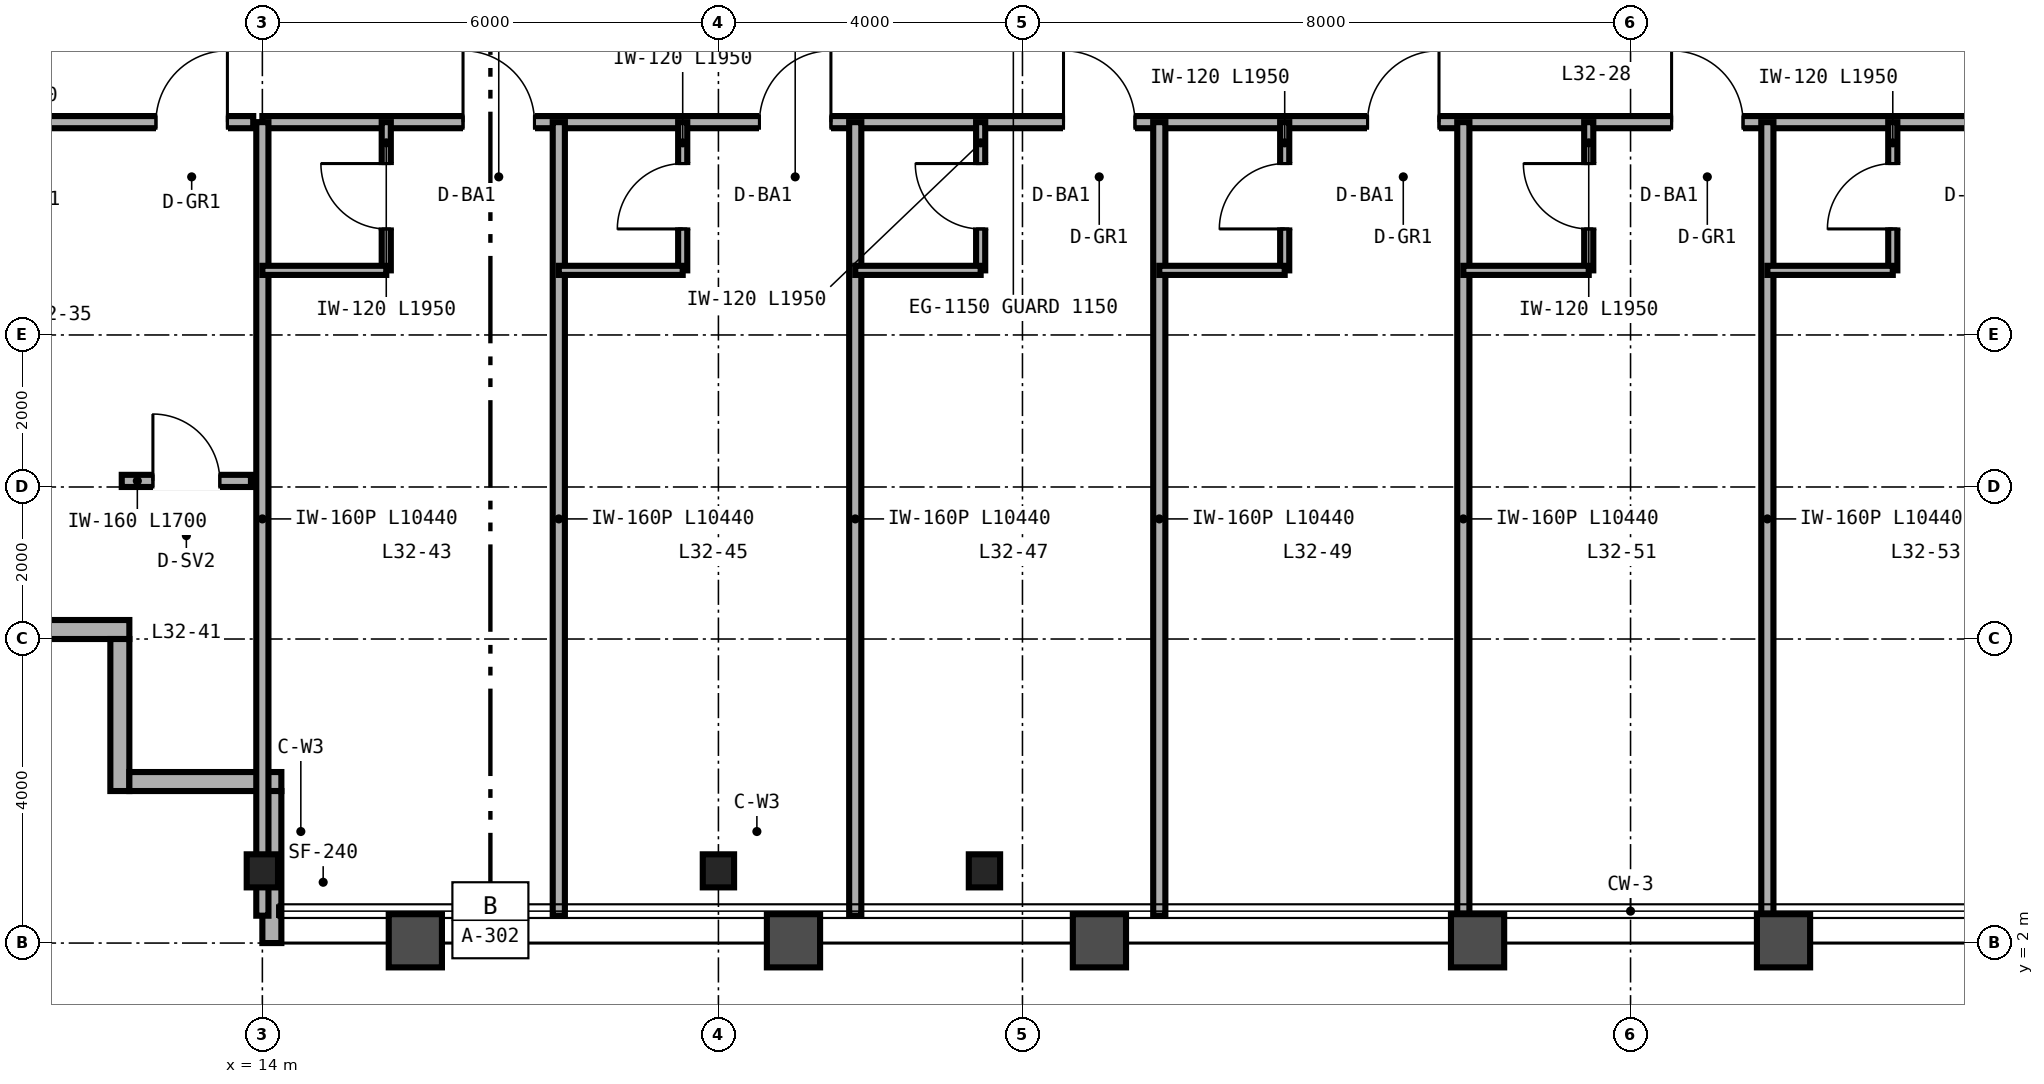
"""IFC4 building model, lengths in metres.
Left out: names, types, materials, properties, quantities, classifications, styles, units other than length and angle.
Written with IfcOpenShell. Run it as: python <this file> out.ifc"""

import sys

from ifc_helpers import new_model, si_unit, direction, frame, frame_2d, origin, origin_2d, place, context, subcontext, project, spatial, rectangle, i_section, extrude, source, transform, mapped, element, fill, save


model = new_model("IFC4")
c1 = context("Model", 3, precision=1e-05, world=origin(), true_north=direction((0.0, 1.0)))
c2 = subcontext(c1, "Body", "Model", "MODEL_VIEW")
j1 = project(units=[si_unit("LENGTHUNIT", "METRE"), si_unit("PLANEANGLEUNIT", "RADIAN")], contexts=[c1])
p1 = place(None, origin())
s1 = spatial("IfcSite", under=j1, at=p1, CompositionType="ELEMENT")
p2 = place(p1, origin())
s2 = spatial("IfcBuilding", under=s1, at=p2, CompositionType="ELEMENT")
p3 = place(p2, frame((0.0, 0.0, 129.6)))
s3 = spatial("IfcBuildingStorey", under=s2, at=p3, CompositionType="ELEMENT", Elevation=129.6)
m1 = source(origin(), c2, "Body", "SweptSolid", [
    extrude(i_section(OverallWidth=0.412, OverallDepth=0.435, WebThickness=0.036, FlangeThickness=0.057, FilletRadius=0.025, at=origin_2d()), origin(), (0.0, 0.0, 1.0), 3.36),
])
for number, where, z_axis, x_axis in (
    (1, (14.0, 2.95, 0.0), (0.0, 0.0, 1.0), (1.0, 0.0, 0.0)),
    (2, (20.0, 2.95, 0.0), (0.0, 0.0, 1.0), (1.0, 0.0, 0.0)),
    (3, (23.5, 2.95, 0.0), (0.0, 0.0, 1.0), (1.0, 0.0, 0.0)),
):
    element("IfcColumn", number, at=place(p3, frame(where, z_axis=z_axis, x_axis=x_axis)), inside=s3, PredefinedType="COLUMN", context=c2, shape_type="MappedRepresentation", body=[
        mapped(m1, transform((0.0, 0.0, 0.0), scale=1.0)),
    ])
for number, where, z_axis, x_axis in (
    (4, (10.25, 6.125, 0.0), (0.0, 0.0, 1.0), (1.0, 0.0, 0.0)),
    (5, (12.125, 6.0, 0.0), (0.0, 0.0, 1.0), (0.0, -1.0, 0.0)),
    (6, (12.25, 4.125, 0.0), (0.0, 0.0, 1.0), (1.0, 0.0, 0.0)),
):
    element("IfcWall", number, at=place(p3, frame(where, z_axis=z_axis, x_axis=x_axis)), inside=s3, PredefinedType="SOLIDWALL", context=c2, shape_type="SweptSolid", body=[
        extrude(rectangle(XDim=2.0, YDim=0.25, at=frame_2d((1.0, 0.0))), origin(), (0.0, 0.0, 1.0), 3.36),
    ])
p4 = place(p3, frame((14.125, 4.0, 0.0), z_axis=(0.0, 0.0, 1.0), x_axis=(0.0, -1.0, 0.0)))
e7 = element("IfcWall", 7, at=p4, inside=s3, PredefinedType="SOLIDWALL", context=c2, shape_type="SweptSolid", body=[
    extrude(rectangle(XDim=2.0, YDim=0.25, at=frame_2d((1.0, 0.0))), origin(), (0.0, 0.0, 1.0), 2.667),
])
p5 = place(p3, frame((8.2, 12.8, 0.0), z_axis=(0.0, 0.0, 1.0), x_axis=(1.0, 0.0, 0.0)))
e8 = element("IfcWall", 8, at=p5, inside=s3, PredefinedType="PARTITIONING", context=c2, shape_type="SweptSolid", body=[
    extrude(rectangle(XDim=5.68, YDim=0.16, at=frame_2d((2.84, 0.0))), origin(), (0.0, 0.0, 1.0), 3.36),
])
p6 = place(p5, frame((4.4, 0.0, 0.0)))
e9 = element("IfcOpeningElement", 9, at=p6, cuts=e8, PredefinedType="OPENING", context=c2, shape_type="SweptSolid", body=[
    extrude(rectangle(XDim=0.94, YDim=2.15, at=frame_2d((0.47, 1.075))), frame((0.0, 0.09, 0.0), z_axis=(0.0, -1.0, 0.0), x_axis=(1.0, 0.0, 0.0)), (0.0, 0.0, 1.0), 0.18),
])
p7 = place(p3, frame((12.15, 8.08, 0.0), z_axis=(0.0, 0.0, 1.0), x_axis=(1.0, 0.0, 0.0)))
e10 = element("IfcWall", 10, at=p7, inside=s3, PredefinedType="PARTITIONING", context=c2, shape_type="SweptSolid", body=[
    extrude(rectangle(XDim=1.7, YDim=0.16, at=frame_2d((0.85, 0.0))), origin(), (0.0, 0.0, 1.0), 3.36),
])
p8 = place(p7, frame((0.41, 0.0, 0.0)))
e11 = element("IfcOpeningElement", 11, at=p8, cuts=e10, PredefinedType="OPENING", context=c2, shape_type="SweptSolid", body=[
    extrude(rectangle(XDim=0.88, YDim=2.15, at=frame_2d((0.44, 1.075))), frame((0.0, 0.09, 0.0), z_axis=(0.0, -1.0, 0.0), x_axis=(1.0, 0.0, 0.0)), (0.0, 0.0, 1.0), 0.18),
])
p9 = place(p3, frame((14.0, 12.8, 0.0), z_axis=(0.0, 0.0, 1.0), x_axis=(1.0, 0.0, 0.0)))
e12 = element("IfcWall", 12, at=p9, inside=s3, PredefinedType="PARTITIONING", context=c2, shape_type="SweptSolid", body=[
    extrude(rectangle(XDim=36.0, YDim=0.16, at=frame_2d((18.0, 0.0))), origin(), (0.0, 0.0, 1.0), 2.581),
])
p10 = place(p9, frame((2.64, 0.0, 0.0)))
e13 = element("IfcOpeningElement", 13, at=p10, cuts=e12, PredefinedType="OPENING", context=c2, shape_type="SweptSolid", body=[
    extrude(rectangle(XDim=0.94, YDim=2.15, at=frame_2d((0.47, 1.075))), frame((0.0, 0.09, 0.0), z_axis=(0.0, -1.0, 0.0), x_axis=(1.0, 0.0, 0.0)), (0.0, 0.0, 1.0), 0.18),
])
p11 = place(p9, frame((6.54, 0.0, 0.0)))
e14 = element("IfcOpeningElement", 14, at=p11, cuts=e12, PredefinedType="OPENING", context=c2, shape_type="SweptSolid", body=[
    extrude(rectangle(XDim=0.94, YDim=2.15, at=frame_2d((0.47, 1.075))), frame((0.0, 0.09, 0.0), z_axis=(0.0, -1.0, 0.0), x_axis=(1.0, 0.0, 0.0)), (0.0, 0.0, 1.0), 0.18),
])
p12 = place(p9, frame((10.54, 0.0, 0.0)))
e15 = element("IfcOpeningElement", 15, at=p12, cuts=e12, PredefinedType="OPENING", context=c2, shape_type="SweptSolid", body=[
    extrude(rectangle(XDim=0.94, YDim=2.15, at=frame_2d((0.47, 1.075))), frame((0.0, 0.09, 0.0), z_axis=(0.0, -1.0, 0.0), x_axis=(1.0, 0.0, 0.0)), (0.0, 0.0, 1.0), 0.18),
])
p13 = place(p9, frame((14.54, 0.0, 0.0)))
e16 = element("IfcOpeningElement", 16, at=p13, cuts=e12, PredefinedType="OPENING", context=c2, shape_type="SweptSolid", body=[
    extrude(rectangle(XDim=0.94, YDim=2.15, at=frame_2d((0.47, 1.075))), frame((0.0, 0.09, 0.0), z_axis=(0.0, -1.0, 0.0), x_axis=(1.0, 0.0, 0.0)), (0.0, 0.0, 1.0), 0.18),
])
p14 = place(p9, frame((18.54, 0.0, 0.0)))
e17 = element("IfcOpeningElement", 17, at=p14, cuts=e12, PredefinedType="OPENING", context=c2, shape_type="SweptSolid", body=[
    extrude(rectangle(XDim=0.94, YDim=2.15, at=frame_2d((0.47, 1.075))), frame((0.0, 0.09, 0.0), z_axis=(0.0, -1.0, 0.0), x_axis=(1.0, 0.0, 0.0)), (0.0, 0.0, 1.0), 0.18),
])
p15 = place(p9, frame((22.54, 0.0, 0.0)))
e18 = element("IfcOpeningElement", 18, at=p15, cuts=e12, PredefinedType="OPENING", context=c2, shape_type="SweptSolid", body=[
    extrude(rectangle(XDim=0.94, YDim=2.15, at=frame_2d((0.47, 1.075))), frame((0.0, 0.09, 0.0), z_axis=(0.0, -1.0, 0.0), x_axis=(1.0, 0.0, 0.0)), (0.0, 0.0, 1.0), 0.18),
])
p16 = place(p9, frame((26.54, 0.0, 0.0)))
e19 = element("IfcOpeningElement", 19, at=p16, cuts=e12, PredefinedType="OPENING", context=c2, shape_type="SweptSolid", body=[
    extrude(rectangle(XDim=0.94, YDim=2.15, at=frame_2d((0.47, 1.075))), frame((0.0, 0.09, 0.0), z_axis=(0.0, -1.0, 0.0), x_axis=(1.0, 0.0, 0.0)), (0.0, 0.0, 1.0), 0.18),
])
p17 = place(p9, frame((30.64, 0.0, 0.0)))
e20 = element("IfcOpeningElement", 20, at=p17, cuts=e12, PredefinedType="OPENING", context=c2, shape_type="SweptSolid", body=[
    extrude(rectangle(XDim=0.94, YDim=2.15, at=frame_2d((0.47, 1.075))), frame((0.0, 0.09, 0.0), z_axis=(0.0, -1.0, 0.0), x_axis=(1.0, 0.0, 0.0)), (0.0, 0.0, 1.0), 0.18),
])
p18 = place(p9, frame((34.74, 0.0, 0.0)))
e21 = element("IfcOpeningElement", 21, at=p18, cuts=e12, PredefinedType="OPENING", context=c2, shape_type="SweptSolid", body=[
    extrude(rectangle(XDim=0.94, YDim=2.15, at=frame_2d((0.47, 1.075))), frame((0.0, 0.09, 0.0), z_axis=(0.0, -1.0, 0.0), x_axis=(1.0, 0.0, 0.0)), (0.0, 0.0, 1.0), 0.18),
])
for number, where, z_axis, x_axis in (
    (22, (14.0, 2.36, 0.0), (0.0, 0.0, 1.0), (0.0, 1.0, 0.0)),
    (23, (17.9, 2.36, 0.0), (0.0, 0.0, 1.0), (0.0, 1.0, 0.0)),
):
    element("IfcWall", number, at=place(p3, frame(where, z_axis=z_axis, x_axis=x_axis)), inside=s3, PredefinedType="PARTITIONING", context=c2, shape_type="SweptSolid", body=[
        extrude(rectangle(XDim=10.44, YDim=0.16, at=frame_2d((5.22, 0.0))), origin(), (0.0, 0.0, 1.0), 2.667),
    ])
p19 = place(p3, frame((15.63, 10.85, 0.0), z_axis=(0.0, 0.0, 1.0), x_axis=(0.0, 1.0, 0.0)))
e24 = element("IfcWall", 24, at=p19, inside=s3, PredefinedType="PARTITIONING", context=c2, shape_type="SweptSolid", body=[
    extrude(rectangle(XDim=1.95, YDim=0.12, at=frame_2d((0.975, 0.0))), origin(), (0.0, 0.0, 1.0), 3.36),
])
p20 = place(p19, frame((0.545, 0.0, 0.0)))
e25 = element("IfcOpeningElement", 25, at=p20, cuts=e24, PredefinedType="OPENING", context=c2, shape_type="SweptSolid", body=[
    extrude(rectangle(XDim=0.86, YDim=2.1, at=frame_2d((0.43, 1.05))), frame((0.0, 0.07, 0.0), z_axis=(0.0, -1.0, 0.0), x_axis=(1.0, 0.0, 0.0)), (0.0, 0.0, 1.0), 0.14),
])
p21 = place(p3, frame((14.0, 10.85, 0.0), z_axis=(0.0, 0.0, 1.0), x_axis=(1.0, 0.0, 0.0)))
e26 = element("IfcWall", 26, at=p21, inside=s3, PredefinedType="PARTITIONING", context=c2, shape_type="SweptSolid", body=[
    extrude(rectangle(XDim=1.63, YDim=0.12, at=frame_2d((0.815, 0.0))), origin(), (0.0, 0.0, 1.0), 3.36),
])
p22 = place(p3, frame((21.8, 2.36, 0.0), z_axis=(0.0, 0.0, 1.0), x_axis=(0.0, 1.0, 0.0)))
e27 = element("IfcWall", 27, at=p22, inside=s3, PredefinedType="PARTITIONING", context=c2, shape_type="SweptSolid", body=[
    extrude(rectangle(XDim=10.44, YDim=0.16, at=frame_2d((5.22, 0.0))), origin(), (0.0, 0.0, 1.0), 2.823),
])
p23 = place(p3, frame((19.53, 10.85, 0.0), z_axis=(0.0, 0.0, 1.0), x_axis=(0.0, 1.0, 0.0)))
e28 = element("IfcWall", 28, at=p23, inside=s3, PredefinedType="PARTITIONING", context=c2, shape_type="SweptSolid", body=[
    extrude(rectangle(XDim=1.95, YDim=0.12, at=frame_2d((0.975, 0.0))), origin(), (0.0, 0.0, 1.0), 3.36),
])
p24 = place(p23, frame((0.545, 0.0, 0.0)))
e29 = element("IfcOpeningElement", 29, at=p24, cuts=e28, PredefinedType="OPENING", context=c2, shape_type="SweptSolid", body=[
    extrude(rectangle(XDim=0.86, YDim=2.1, at=frame_2d((0.43, 1.05))), frame((0.0, 0.07, 0.0), z_axis=(0.0, -1.0, 0.0), x_axis=(1.0, 0.0, 0.0)), (0.0, 0.0, 1.0), 0.14),
])
p25 = place(p3, frame((17.9, 10.85, 0.0), z_axis=(0.0, 0.0, 1.0), x_axis=(1.0, 0.0, 0.0)))
e30 = element("IfcWall", 30, at=p25, inside=s3, PredefinedType="PARTITIONING", context=c2, shape_type="SweptSolid", body=[
    extrude(rectangle(XDim=1.63, YDim=0.12, at=frame_2d((0.815, 0.0))), origin(), (0.0, 0.0, 1.0), 3.36),
])
p26 = place(p3, frame((25.8, 2.36, 0.0), z_axis=(0.0, 0.0, 1.0), x_axis=(0.0, 1.0, 0.0)))
e31 = element("IfcWall", 31, at=p26, inside=s3, PredefinedType="PARTITIONING", context=c2, shape_type="SweptSolid", body=[
    extrude(rectangle(XDim=10.44, YDim=0.16, at=frame_2d((5.22, 0.0))), origin(), (0.0, 0.0, 1.0), 2.433),
])
p27 = place(p3, frame((23.45, 10.85, 0.0), z_axis=(0.0, 0.0, 1.0), x_axis=(0.0, 1.0, 0.0)))
e32 = element("IfcWall", 32, at=p27, inside=s3, PredefinedType="PARTITIONING", context=c2, shape_type="SweptSolid", body=[
    extrude(rectangle(XDim=1.95, YDim=0.12, at=frame_2d((0.975, 0.0))), origin(), (0.0, 0.0, 1.0), 2.581),
])
p28 = place(p27, frame((0.545, 0.0, 0.0)))
e33 = element("IfcOpeningElement", 33, at=p28, cuts=e32, PredefinedType="OPENING", context=c2, shape_type="SweptSolid", body=[
    extrude(rectangle(XDim=0.86, YDim=2.1, at=frame_2d((0.43, 1.05))), frame((0.0, 0.07, 0.0), z_axis=(0.0, -1.0, 0.0), x_axis=(1.0, 0.0, 0.0)), (0.0, 0.0, 1.0), 0.14),
])
p29 = place(p3, frame((21.8, 10.85, 0.0), z_axis=(0.0, 0.0, 1.0), x_axis=(1.0, 0.0, 0.0)))
e34 = element("IfcWall", 34, at=p29, inside=s3, PredefinedType="PARTITIONING", context=c2, shape_type="SweptSolid", body=[
    extrude(rectangle(XDim=1.65, YDim=0.12, at=frame_2d((0.825, 0.0))), origin(), (0.0, 0.0, 1.0), 2.581),
])
p30 = place(p3, frame((29.8, 2.36, 0.0), z_axis=(0.0, 0.0, 1.0), x_axis=(0.0, 1.0, 0.0)))
e35 = element("IfcWall", 35, at=p30, inside=s3, PredefinedType="PARTITIONING", context=c2, shape_type="SweptSolid", body=[
    extrude(rectangle(XDim=10.44, YDim=0.16, at=frame_2d((5.22, 0.0))), origin(), (0.0, 0.0, 1.0), 2.433),
])
p31 = place(p3, frame((27.45, 10.85, 0.0), z_axis=(0.0, 0.0, 1.0), x_axis=(0.0, 1.0, 0.0)))
e36 = element("IfcWall", 36, at=p31, inside=s3, PredefinedType="PARTITIONING", context=c2, shape_type="SweptSolid", body=[
    extrude(rectangle(XDim=1.95, YDim=0.12, at=frame_2d((0.975, 0.0))), origin(), (0.0, 0.0, 1.0), 3.36),
])
p32 = place(p31, frame((0.545, 0.0, 0.0)))
e37 = element("IfcOpeningElement", 37, at=p32, cuts=e36, PredefinedType="OPENING", context=c2, shape_type="SweptSolid", body=[
    extrude(rectangle(XDim=0.86, YDim=2.1, at=frame_2d((0.43, 1.05))), frame((0.0, 0.07, 0.0), z_axis=(0.0, -1.0, 0.0), x_axis=(1.0, 0.0, 0.0)), (0.0, 0.0, 1.0), 0.14),
])
p33 = place(p3, frame((25.8, 10.85, 0.0), z_axis=(0.0, 0.0, 1.0), x_axis=(1.0, 0.0, 0.0)))
e38 = element("IfcWall", 38, at=p33, inside=s3, PredefinedType="PARTITIONING", context=c2, shape_type="SweptSolid", body=[
    extrude(rectangle(XDim=1.65, YDim=0.12, at=frame_2d((0.825, 0.0))), origin(), (0.0, 0.0, 1.0), 3.36),
])
p34 = place(p3, frame((33.8, 2.36, 0.0), z_axis=(0.0, 0.0, 1.0), x_axis=(0.0, 1.0, 0.0)))
e39 = element("IfcWall", 39, at=p34, inside=s3, PredefinedType="PARTITIONING", context=c2, shape_type="SweptSolid", body=[
    extrude(rectangle(XDim=10.44, YDim=0.16, at=frame_2d((5.22, 0.0))), origin(), (0.0, 0.0, 1.0), 2.433),
])
p35 = place(p3, frame((31.45, 10.85, 0.0), z_axis=(0.0, 0.0, 1.0), x_axis=(0.0, 1.0, 0.0)))
e40 = element("IfcWall", 40, at=p35, inside=s3, PredefinedType="PARTITIONING", context=c2, shape_type="SweptSolid", body=[
    extrude(rectangle(XDim=1.95, YDim=0.12, at=frame_2d((0.975, 0.0))), origin(), (0.0, 0.0, 1.0), 3.36),
])
p36 = place(p35, frame((0.545, 0.0, 0.0)))
e41 = element("IfcOpeningElement", 41, at=p36, cuts=e40, PredefinedType="OPENING", context=c2, shape_type="SweptSolid", body=[
    extrude(rectangle(XDim=0.86, YDim=2.1, at=frame_2d((0.43, 1.05))), frame((0.0, 0.07, 0.0), z_axis=(0.0, -1.0, 0.0), x_axis=(1.0, 0.0, 0.0)), (0.0, 0.0, 1.0), 0.14),
])
p37 = place(p3, frame((29.8, 10.85, 0.0), z_axis=(0.0, 0.0, 1.0), x_axis=(1.0, 0.0, 0.0)))
e42 = element("IfcWall", 42, at=p37, inside=s3, PredefinedType="PARTITIONING", context=c2, shape_type="SweptSolid", body=[
    extrude(rectangle(XDim=1.65, YDim=0.12, at=frame_2d((0.825, 0.0))), origin(), (0.0, 0.0, 1.0), 3.36),
])
p38 = place(p3, frame((35.45, 10.85, 0.0), z_axis=(0.0, 0.0, 1.0), x_axis=(0.0, 1.0, 0.0)))
e43 = element("IfcWall", 43, at=p38, inside=s3, PredefinedType="PARTITIONING", context=c2, shape_type="SweptSolid", body=[
    extrude(rectangle(XDim=1.95, YDim=0.12, at=frame_2d((0.975, 0.0))), origin(), (0.0, 0.0, 1.0), 3.36),
])
p39 = place(p38, frame((0.545, 0.0, 0.0)))
e44 = element("IfcOpeningElement", 44, at=p39, cuts=e43, PredefinedType="OPENING", context=c2, shape_type="SweptSolid", body=[
    extrude(rectangle(XDim=0.86, YDim=2.1, at=frame_2d((0.43, 1.05))), frame((0.0, 0.07, 0.0), z_axis=(0.0, -1.0, 0.0), x_axis=(1.0, 0.0, 0.0)), (0.0, 0.0, 1.0), 0.14),
])
p40 = place(p3, frame((33.8, 10.85, 0.0), z_axis=(0.0, 0.0, 1.0), x_axis=(1.0, 0.0, 0.0)))
e45 = element("IfcWall", 45, at=p40, inside=s3, PredefinedType="PARTITIONING", context=c2, shape_type="SweptSolid", body=[
    extrude(rectangle(XDim=1.65, YDim=0.12, at=frame_2d((0.825, 0.0))), origin(), (0.0, 0.0, 1.0), 3.36),
])
m2 = source(origin(), c2, "Body", "SweptSolid", [
    extrude(rectangle(XDim=0.94, YDim=2.15, at=frame_2d((0.47, 1.075))), frame((0.0, 0.025, 0.0), z_axis=(0.0, -1.0, 0.0), x_axis=(1.0, 0.0, 0.0)), (0.0, 0.0, 1.0), 0.05),
])
p41 = place(p6, origin())
e46 = element("IfcDoor", 46, at=p41, inside=s3, OperationType="SINGLE_SWING_RIGHT", PredefinedType="DOOR", context=c2, shape_type="MappedRepresentation", body=[
    mapped(m2, transform((0.0, 0.0, 0.0), scale=1.0)),
])
fill(e9, e46)
m3 = source(origin(), c2, "Body", "SweptSolid", [
    extrude(rectangle(XDim=0.88, YDim=2.15, at=frame_2d((0.44, 1.075))), frame((0.0, 0.025, 0.0), z_axis=(0.0, -1.0, 0.0), x_axis=(1.0, 0.0, 0.0)), (0.0, 0.0, 1.0), 0.05),
])
p42 = place(p8, origin())
e47 = element("IfcDoor", 47, at=p42, inside=s3, OperationType="SINGLE_SWING_LEFT", PredefinedType="DOOR", context=c2, shape_type="MappedRepresentation", body=[
    mapped(m3, transform((0.0, 0.0, 0.0), scale=1.0)),
])
fill(e11, e47)
m4 = source(origin(), c2, "Body", "SweptSolid", [
    extrude(rectangle(XDim=0.86, YDim=2.1, at=frame_2d((0.43, 1.05))), frame((0.0, 0.025, 0.0), z_axis=(0.0, -1.0, 0.0), x_axis=(1.0, 0.0, 0.0)), (0.0, 0.0, 1.0), 0.05),
])
p43 = place(p20, origin())
e48 = element("IfcDoor", 48, at=p43, inside=s3, OperationType="SINGLE_SWING_RIGHT", PredefinedType="DOOR", context=c2, shape_type="MappedRepresentation", body=[
    mapped(m4, transform((0.0, 0.0, 0.0), scale=1.0)),
])
fill(e25, e48)
p44 = place(p24, origin())
e49 = element("IfcDoor", 49, at=p44, inside=s3, OperationType="SINGLE_SWING_LEFT", PredefinedType="DOOR", context=c2, shape_type="MappedRepresentation", body=[
    mapped(m4, transform((0.0, 0.0, 0.0), scale=1.0)),
])
fill(e29, e49)
p45 = place(p28, origin())
e50 = element("IfcDoor", 50, at=p45, inside=s3, OperationType="SINGLE_SWING_RIGHT", PredefinedType="DOOR", context=c2, shape_type="MappedRepresentation", body=[
    mapped(m4, transform((0.0, 0.0, 0.0), scale=1.0)),
])
fill(e33, e50)
p46 = place(p32, origin())
e51 = element("IfcDoor", 51, at=p46, inside=s3, OperationType="SINGLE_SWING_LEFT", PredefinedType="DOOR", context=c2, shape_type="MappedRepresentation", body=[
    mapped(m4, transform((0.0, 0.0, 0.0), scale=1.0)),
])
fill(e37, e51)
p47 = place(p36, origin())
e52 = element("IfcDoor", 52, at=p47, inside=s3, OperationType="SINGLE_SWING_RIGHT", PredefinedType="DOOR", context=c2, shape_type="MappedRepresentation", body=[
    mapped(m4, transform((0.0, 0.0, 0.0), scale=1.0)),
])
fill(e41, e52)
p48 = place(p39, origin())
e53 = element("IfcDoor", 53, at=p48, inside=s3, OperationType="SINGLE_SWING_LEFT", PredefinedType="DOOR", context=c2, shape_type="MappedRepresentation", body=[
    mapped(m4, transform((0.0, 0.0, 0.0), scale=1.0)),
])
fill(e44, e53)
p49 = place(p10, origin())
e54 = element("IfcDoor", 54, at=p49, inside=s3, OperationType="SINGLE_SWING_LEFT", PredefinedType="DOOR", context=c2, shape_type="MappedRepresentation", body=[
    mapped(m2, transform((0.0, 0.0, 0.0), scale=1.0)),
])
fill(e13, e54)
p50 = place(p11, origin())
e55 = element("IfcDoor", 55, at=p50, inside=s3, OperationType="SINGLE_SWING_RIGHT", PredefinedType="DOOR", context=c2, shape_type="MappedRepresentation", body=[
    mapped(m2, transform((0.0, 0.0, 0.0), scale=1.0)),
])
fill(e14, e55)
p51 = place(p12, origin())
e56 = element("IfcDoor", 56, at=p51, inside=s3, OperationType="SINGLE_SWING_LEFT", PredefinedType="DOOR", context=c2, shape_type="MappedRepresentation", body=[
    mapped(m2, transform((0.0, 0.0, 0.0), scale=1.0)),
])
fill(e15, e56)
p52 = place(p13, origin())
e57 = element("IfcDoor", 57, at=p52, inside=s3, OperationType="SINGLE_SWING_RIGHT", PredefinedType="DOOR", context=c2, shape_type="MappedRepresentation", body=[
    mapped(m2, transform((0.0, 0.0, 0.0), scale=1.0)),
])
fill(e16, e57)
p53 = place(p14, origin())
e58 = element("IfcDoor", 58, at=p53, inside=s3, OperationType="SINGLE_SWING_LEFT", PredefinedType="DOOR", context=c2, shape_type="MappedRepresentation", body=[
    mapped(m2, transform((0.0, 0.0, 0.0), scale=1.0)),
])
fill(e17, e58)
save(model, sys.argv[1])
